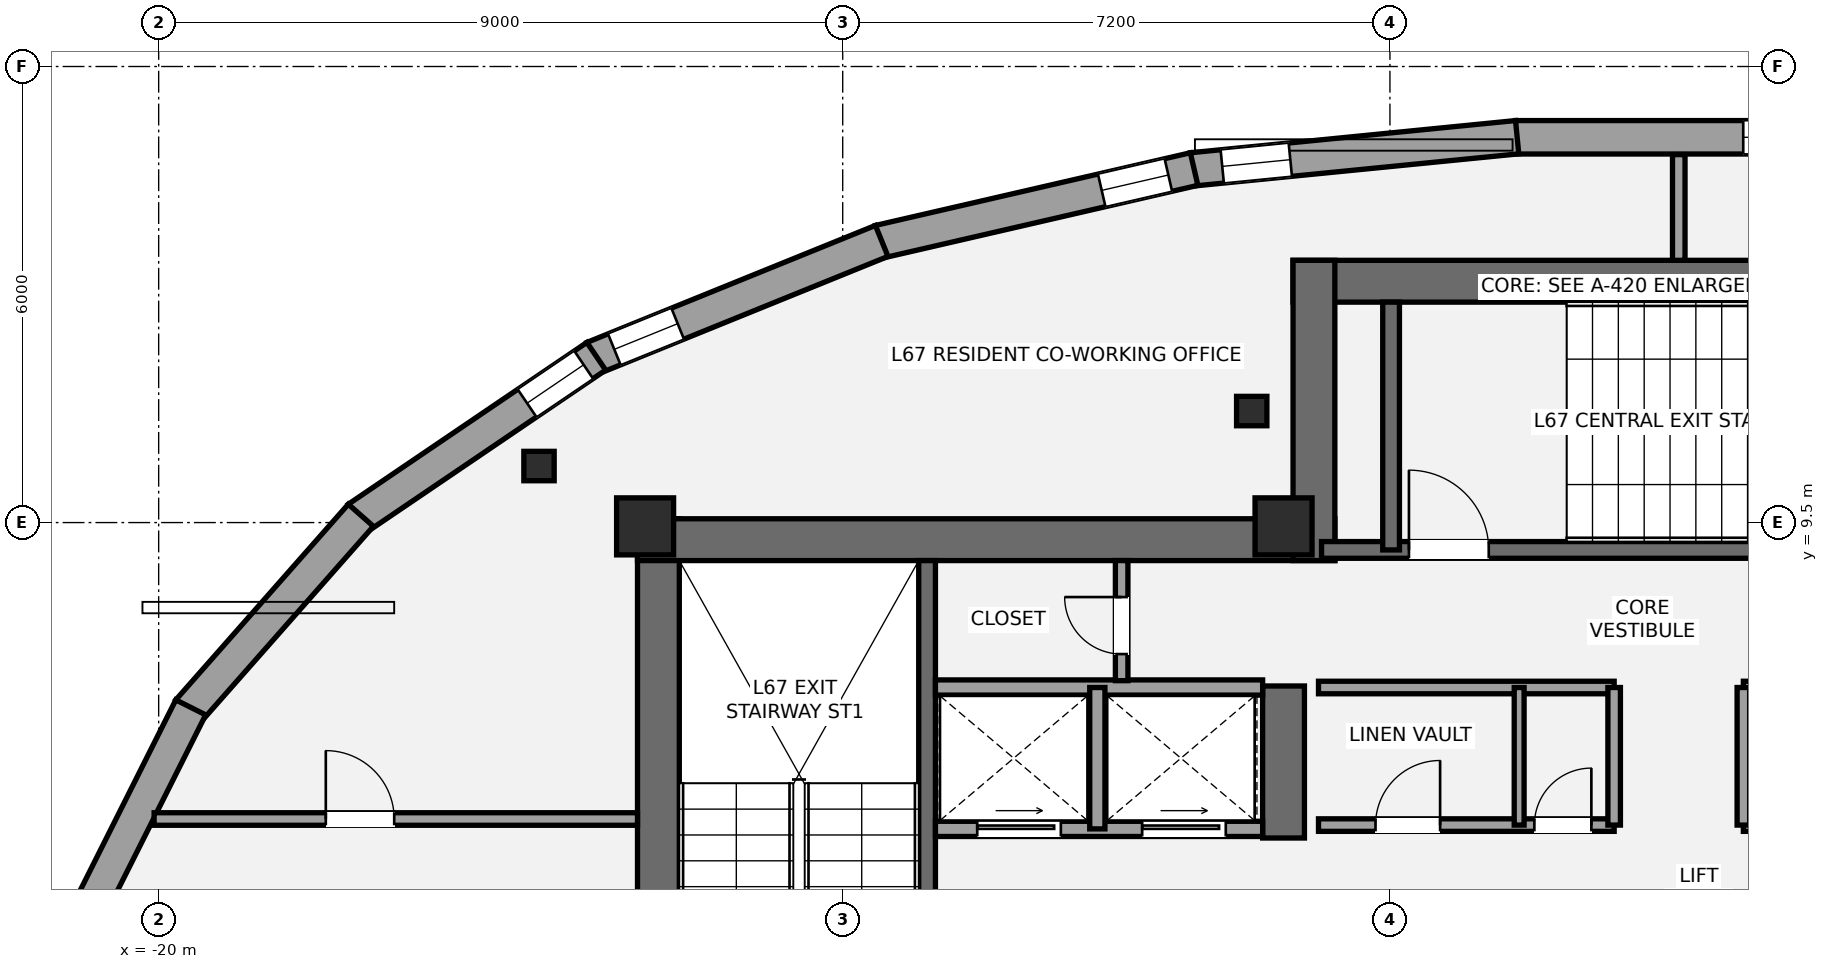
"""IFC4 building model, lengths in metres.
Left out: names, types, materials, properties, quantities, classifications, styles, units other than length and angle.
Written with IfcOpenShell. Run it as: python <this file> out.ifc"""

import sys

from ifc_helpers import new_model, si_unit, direction, frame, frame_2d, origin, origin_2d, place, context, subcontext, project, spatial, rectangle, i_section, extrude, element, fill, save


model = new_model("IFC4")
c1 = context("Model", 3, precision=1e-05, world=origin(), true_north=direction((0.0, 1.0)))
c2 = subcontext(c1, "Body", "Model", "MODEL_VIEW")
j1 = project(units=[si_unit("LENGTHUNIT", "METRE"), si_unit("PLANEANGLEUNIT", "RADIAN")], contexts=[c1])
p1 = place(None, origin())
s1 = spatial("IfcSite", under=j1, at=p1, CompositionType="ELEMENT")
p2 = place(p1, origin())
s2 = spatial("IfcBuilding", under=s1, at=p2, CompositionType="ELEMENT")
p3 = place(p2, frame((0.0, 0.0, 238.35)))
s3 = spatial("IfcBuildingStorey", under=s2, at=p3, CompositionType="ELEMENT", Elevation=238.35)
p4 = place(p3, frame((-13.425, 1.3, 0.0), z_axis=(0.0, 0.0, 1.0), x_axis=(0.0, 1.0, 0.0)))
e1 = element("IfcWall", 1, at=p4, inside=s3, PredefinedType="SHEAR", context=c2, shape_type="SweptSolid", body=[
    extrude(rectangle(XDim=8.25, YDim=0.55, at=frame_2d((4.125, 0.0))), origin(), (0.0, 0.0, 1.0), 3.15),
])
p5 = place(p3, frame((-13.7, 9.275, 0.0), z_axis=(0.0, 0.0, 1.0), x_axis=(1.0, 0.0, 0.0)))
e2 = element("IfcWall", 2, at=p5, inside=s3, PredefinedType="SHEAR", context=c2, shape_type="SweptSolid", body=[
    extrude(rectangle(XDim=9.175, YDim=0.55, at=frame_2d((4.587, 0.0))), origin(), (0.0, 0.0, 1.0), 3.15),
])
p6 = place(p3, frame((-5.2, 5.35, 0.0), z_axis=(0.0, 0.0, 1.0), x_axis=(0.0, 1.0, 0.0)))
e3 = element("IfcWall", 3, at=p6, inside=s3, PredefinedType="SHEAR", context=c2, shape_type="SweptSolid", body=[
    extrude(rectangle(XDim=2.0, YDim=0.55, at=frame_2d((1.0, 0.0))), origin(), (0.0, 0.0, 1.0), 3.15),
])
p7 = place(p3, frame((-9.89, 1.85, 0.0), z_axis=(0.0, 0.0, 1.0), x_axis=(0.0, 1.0, 0.0)))
e4 = element("IfcWall", 4, at=p7, inside=s3, PredefinedType="SHEAR", context=c2, shape_type="SweptSolid", body=[
    extrude(rectangle(XDim=7.15, YDim=0.22, at=frame_2d((3.575, 0.0))), origin(), (0.0, 0.0, 1.0), 3.15),
])
p8 = place(p3, frame((-5.075, 12.675, 0.0), z_axis=(0.0, 0.0, 1.0), x_axis=(1.0, 0.0, 0.0)))
e5 = element("IfcWall", 5, at=p8, inside=s3, PredefinedType="SHEAR", context=c2, shape_type="SweptSolid", body=[
    extrude(rectangle(XDim=10.15, YDim=0.55, at=frame_2d((5.075, 0.0))), origin(), (0.0, 0.0, 1.0), 3.15),
])
p9 = place(p3, frame((-4.8, 9.0, 0.0), z_axis=(0.0, 0.0, 1.0), x_axis=(0.0, 1.0, 0.0)))
e6 = element("IfcWall", 6, at=p9, inside=s3, PredefinedType="SHEAR", context=c2, shape_type="SweptSolid", body=[
    extrude(rectangle(XDim=3.95, YDim=0.55, at=frame_2d((1.975, 0.0))), origin(), (0.0, 0.0, 1.0), 3.15),
])
p10 = place(p3, frame((-4.7, 9.14, 0.0), z_axis=(0.0, 0.0, 1.0), x_axis=(1.0, 0.0, 0.0)))
e7 = element("IfcWall", 7, at=p10, inside=s3, PredefinedType="SHEAR", context=c2, shape_type="SweptSolid", body=[
    extrude(rectangle(XDim=9.3, YDim=0.22, at=frame_2d((4.65, 0.0))), origin(), (0.0, 0.0, 1.0), 3.15),
])
p11 = place(p10, frame((1.15, 0.0, 0.0)))
e8 = element("IfcOpeningElement", 8, at=p11, cuts=e7, PredefinedType="OPENING", context=c2, shape_type="SweptSolid", body=[
    extrude(rectangle(XDim=1.05, YDim=2.15, at=frame_2d((0.525, 1.075))), frame((0.0, 0.12, 0.0), z_axis=(0.0, -1.0, 0.0), x_axis=(1.0, 0.0, 0.0)), (0.0, 0.0, 1.0), 0.24),
])
p12 = place(p3, frame((-3.785, 9.14, 0.0), z_axis=(0.0, 0.0, 1.0), x_axis=(0.0, 1.0, 0.0)))
e9 = element("IfcWall", 9, at=p12, inside=s3, PredefinedType="SHEAR", context=c2, shape_type="SweptSolid", body=[
    extrude(rectangle(XDim=3.26, YDim=0.22, at=frame_2d((1.63, 0.0))), origin(), (0.0, 0.0, 1.0), 3.15),
])
for number, where, z_axis, x_axis in (
    (10, (-13.6, 9.45, 0.0), (0.0, 0.0, 1.0), (1.0, 0.0, 0.0)),
    (11, (-5.2, 9.45, 0.0), (0.0, 0.0, 1.0), (1.0, 0.0, 0.0)),
):
    element("IfcColumn", number, at=place(p3, frame(where, z_axis=z_axis, x_axis=x_axis)), inside=s3, PredefinedType="PILASTER", context=c2, shape_type="SweptSolid", body=[
        extrude(rectangle(XDim=0.75, YDim=0.75, at=origin_2d()), origin(), (0.0, 0.0, 1.0), 3.15),
    ])
for number, where, z_axis, x_axis in (
    (12, (-5.619, 10.967, 0.0), (0.0, 0.0, 1.0), (1.0, 0.0, 0.0)),
    (13, (-14.996, 10.244, 0.0), (0.0, 0.0, 1.0), (1.0, 0.0, 0.0)),
):
    element("IfcColumn", number, at=place(p3, frame(where, z_axis=z_axis, x_axis=x_axis)), inside=s3, PredefinedType="COLUMN", context=c2, shape_type="SweptSolid", body=[
        extrude(i_section(OverallWidth=0.399, OverallDepth=0.387, WebThickness=0.021, FlangeThickness=0.033, at=origin_2d()), origin(), (0.0, 0.0, 1.0), 3.15),
    ])
p13 = place(p3, frame((-2.148, 14.569, 0.0), z_axis=(0.0, 0.0, 1.0), x_axis=(1.0, 0.0, 0.0)))
e14 = element("IfcWall", 14, at=p13, inside=s3, PredefinedType="STANDARD", context=c2, shape_type="SweptSolid", body=[
    extrude(rectangle(XDim=4.296, YDim=0.44, at=frame_2d((2.148, 0.0))), origin(), (0.0, 0.0, 1.0), 2.336),
])
p14 = place(p13, frame((2.996, 0.0, 0.58)))
e15 = element("IfcOpeningElement", 15, at=p14, cuts=e14, PredefinedType="OPENING", context=c2, shape_type="SweptSolid", body=[
    extrude(rectangle(XDim=0.9, YDim=1.35, at=frame_2d((0.45, 0.675))), frame((0.0, 0.23, 0.0), z_axis=(0.0, -1.0, 0.0), x_axis=(1.0, 0.0, 0.0)), (0.0, 0.0, 1.0), 0.46),
])
p15 = place(p3, frame((-6.405, 14.146, 0.0), z_axis=(0.0, 0.0, 1.0), x_axis=(0.995134540264, 0.098525361068, 0.0)))
e16 = element("IfcWall", 16, at=p15, inside=s3, PredefinedType="STANDARD", context=c2, shape_type="SweptSolid", body=[
    extrude(rectangle(XDim=4.299, YDim=0.44, at=frame_2d((2.15, 0.0))), origin(), (0.0, 0.0, 1.0), 2.336),
])
p16 = place(p15, frame((0.4, 0.0, 0.58)))
e17 = element("IfcOpeningElement", 17, at=p16, cuts=e16, PredefinedType="OPENING", context=c2, shape_type="SweptSolid", body=[
    extrude(rectangle(XDim=0.9, YDim=1.35, at=frame_2d((0.45, 0.675))), frame((0.0, 0.23, 0.0), z_axis=(0.0, -1.0, 0.0), x_axis=(1.0, 0.0, 0.0)), (0.0, 0.0, 1.0), 0.46),
])
p17 = place(p3, frame((-10.52, 13.195, 0.0), z_axis=(0.0, 0.0, 1.0), x_axis=(0.974398936081, 0.224825962391, 0.0)))
e18 = element("IfcWall", 18, at=p17, inside=s3, PredefinedType="STANDARD", context=c2, shape_type="SweptSolid", body=[
    extrude(rectangle(XDim=4.252, YDim=0.44, at=frame_2d((2.126, 0.0))), origin(), (0.0, 0.0, 1.0), 2.336),
])
p18 = place(p17, frame((3.005, 0.0, 0.58)))
e19 = element("IfcOpeningElement", 19, at=p18, cuts=e18, PredefinedType="OPENING", context=c2, shape_type="SweptSolid", body=[
    extrude(rectangle(XDim=0.9, YDim=1.35, at=frame_2d((0.45, 0.675))), frame((0.0, 0.23, 0.0), z_axis=(0.0, -1.0, 0.0), x_axis=(1.0, 0.0, 0.0)), (0.0, 0.0, 1.0), 0.46),
])
p19 = place(p3, frame((-14.283, 11.666, 0.0), z_axis=(0.0, 0.0, 1.0), x_axis=(0.926731976866, 0.375723093586, 0.0)))
e20 = element("IfcWall", 20, at=p19, inside=s3, PredefinedType="STANDARD", context=c2, shape_type="SweptSolid", body=[
    extrude(rectangle(XDim=4.096, YDim=0.44, at=frame_2d((2.048, 0.0))), origin(), (0.0, 0.0, 1.0), 2.336),
])
p20 = place(p19, frame((0.3, 0.0, 0.58)))
e21 = element("IfcOpeningElement", 21, at=p20, cuts=e20, PredefinedType="OPENING", context=c2, shape_type="SweptSolid", body=[
    extrude(rectangle(XDim=0.9, YDim=1.35, at=frame_2d((0.45, 0.675))), frame((0.0, 0.23, 0.0), z_axis=(0.0, -1.0, 0.0), x_axis=(1.0, 0.0, 0.0)), (0.0, 0.0, 1.0), 0.46),
])
p21 = place(p3, frame((-17.381, 9.559, 0.0), z_axis=(0.0, 0.0, 1.0), x_axis=(0.827637036896, 0.561263694851, 0.0)))
e22 = element("IfcWall", 22, at=p21, inside=s3, PredefinedType="STANDARD", context=c2, shape_type="SweptSolid", body=[
    extrude(rectangle(XDim=3.793, YDim=0.44, at=frame_2d((1.896, 0.0))), origin(), (0.0, 0.0, 1.0), 2.336),
])
p22 = place(p21, frame((2.693, 0.0, 0.58)))
e23 = element("IfcOpeningElement", 23, at=p22, cuts=e22, PredefinedType="OPENING", context=c2, shape_type="SweptSolid", body=[
    extrude(rectangle(XDim=0.9, YDim=1.35, at=frame_2d((0.45, 0.675))), frame((0.0, 0.23, 0.0), z_axis=(0.0, -1.0, 0.0), x_axis=(1.0, 0.0, 0.0)), (0.0, 0.0, 1.0), 0.46),
])
p23 = place(p3, frame((-19.61, 7.022, 0.0), z_axis=(0.0, 0.0, 1.0), x_axis=(0.66136043846, 0.750068243855, 0.0)))
e24 = element("IfcWall", 24, at=p23, inside=s3, PredefinedType="STANDARD", context=c2, shape_type="SweptSolid", body=[
    extrude(rectangle(XDim=3.432, YDim=0.44, at=frame_2d((1.716, 0.0))), origin(), (0.0, 0.0, 1.0), 2.336),
])
p24 = place(p3, frame((-20.988, 4.259, 0.0), z_axis=(0.0, 0.0, 1.0), x_axis=(0.448424724145, 0.893820601002, 0.0)))
e25 = element("IfcWall", 25, at=p24, inside=s3, PredefinedType="STANDARD", context=c2, shape_type="SweptSolid", body=[
    extrude(rectangle(XDim=3.144, YDim=0.44, at=frame_2d((1.572, 0.0))), origin(), (0.0, 0.0, 1.0), 2.336),
])
p25 = place(p3, frame((-9.78, 5.47, 0.0), z_axis=(0.0, 0.0, 1.0), x_axis=(1.0, 0.0, 0.0)))
e26 = element("IfcWall", 26, at=p25, inside=s3, PredefinedType="SOLIDWALL", context=c2, shape_type="SweptSolid", body=[
    extrude(rectangle(XDim=4.305, YDim=0.2, at=frame_2d((2.152, 0.0))), origin(), (0.0, 0.0, 1.0), 2.97),
])
p26 = place(p25, frame((0.55, 0.0, 0.0)))
e27 = element("IfcOpeningElement", 27, at=p26, cuts=e26, PredefinedType="OPENING", context=c2, shape_type="SweptSolid", body=[
    extrude(rectangle(XDim=1.1, YDim=2.2, at=frame_2d((0.55, 1.1))), frame((0.0, 0.11, 0.0), z_axis=(0.0, -1.0, 0.0), x_axis=(1.0, 0.0, 0.0)), (0.0, 0.0, 1.0), 0.22),
])
p27 = place(p25, frame((2.72, 0.0, 0.0)))
e28 = element("IfcOpeningElement", 28, at=p27, cuts=e26, PredefinedType="OPENING", context=c2, shape_type="SweptSolid", body=[
    extrude(rectangle(XDim=1.1, YDim=2.2, at=frame_2d((0.55, 1.1))), frame((0.0, 0.11, 0.0), z_axis=(0.0, -1.0, 0.0), x_axis=(1.0, 0.0, 0.0)), (0.0, 0.0, 1.0), 0.22),
])
p28 = place(p3, frame((-9.78, 7.33, 0.0), z_axis=(0.0, 0.0, 1.0), x_axis=(1.0, 0.0, 0.0)))
e29 = element("IfcWall", 29, at=p28, inside=s3, PredefinedType="SOLIDWALL", context=c2, shape_type="SweptSolid", body=[
    extrude(rectangle(XDim=4.305, YDim=0.2, at=frame_2d((2.152, 0.0))), origin(), (0.0, 0.0, 1.0), 2.97),
])
p29 = place(p3, frame((-7.65, 5.47, 0.0), z_axis=(0.0, 0.0, 1.0), x_axis=(0.0, 1.0, 0.0)))
e30 = element("IfcWall", 30, at=p29, inside=s3, PredefinedType="SOLIDWALL", context=c2, shape_type="SweptSolid", body=[
    extrude(rectangle(XDim=1.86, YDim=0.2, at=frame_2d((0.93, 0.0))), origin(), (0.0, 0.0, 1.0), 2.97),
])
p30 = place(p3, frame((-4.74, 5.52, 0.0), z_axis=(0.0, 0.0, 1.0), x_axis=(1.0, 0.0, 0.0)))
e31 = element("IfcWall", 31, at=p30, inside=s3, PredefinedType="PARTITIONING", context=c2, shape_type="SweptSolid", body=[
    extrude(rectangle(XDim=3.89, YDim=0.165, at=frame_2d((1.945, 0.0))), origin(), (0.0, 0.0, 1.0), 2.97),
])
p31 = place(p30, frame((0.75, 0.0, 0.0)))
e32 = element("IfcOpeningElement", 32, at=p31, cuts=e31, PredefinedType="OPENING", context=c2, shape_type="SweptSolid", body=[
    extrude(rectangle(XDim=0.85, YDim=2.1, at=frame_2d((0.425, 1.05))), frame((0.0, 0.093, 0.0), z_axis=(0.0, -1.0, 0.0), x_axis=(1.0, 0.0, 0.0)), (0.0, 0.0, 1.0), 0.185),
])
p32 = place(p30, frame((2.84, 0.0, 0.0)))
e33 = element("IfcOpeningElement", 33, at=p32, cuts=e31, PredefinedType="OPENING", context=c2, shape_type="SweptSolid", body=[
    extrude(rectangle(XDim=0.75, YDim=2.1, at=frame_2d((0.375, 1.05))), frame((0.0, 0.093, 0.0), z_axis=(0.0, -1.0, 0.0), x_axis=(1.0, 0.0, 0.0)), (0.0, 0.0, 1.0), 0.185),
])
p33 = place(p3, frame((-4.74, 7.33, 0.0), z_axis=(0.0, 0.0, 1.0), x_axis=(1.0, 0.0, 0.0)))
e34 = element("IfcWall", 34, at=p33, inside=s3, PredefinedType="PARTITIONING", context=c2, shape_type="SweptSolid", body=[
    extrude(rectangle(XDim=3.89, YDim=0.165, at=frame_2d((1.945, 0.0))), origin(), (0.0, 0.0, 1.0), 2.97),
])
p34 = place(p3, frame((-0.85, 5.52, 0.0), z_axis=(0.0, 0.0, 1.0), x_axis=(0.0, 1.0, 0.0)))
e35 = element("IfcWall", 35, at=p34, inside=s3, PredefinedType="PARTITIONING", context=c2, shape_type="SweptSolid", body=[
    extrude(rectangle(XDim=1.81, YDim=0.165, at=frame_2d((0.905, 0.0))), origin(), (0.0, 0.0, 1.0), 2.97),
])
p35 = place(p3, frame((0.85, 5.52, 0.0), z_axis=(0.0, 0.0, 1.0), x_axis=(1.0, 0.0, 0.0)))
e36 = element("IfcWall", 36, at=p35, inside=s3, PredefinedType="PARTITIONING", context=c2, shape_type="SweptSolid", body=[
    extrude(rectangle(XDim=3.89, YDim=0.165, at=frame_2d((1.945, 0.0))), origin(), (0.0, 0.0, 1.0), 2.97),
])
p36 = place(p35, frame((1.6, 0.0, 0.0)))
e37 = element("IfcOpeningElement", 37, at=p36, cuts=e36, PredefinedType="OPENING", context=c2, shape_type="SweptSolid", body=[
    extrude(rectangle(XDim=0.85, YDim=2.1, at=frame_2d((0.425, 1.05))), frame((0.0, 0.093, 0.0), z_axis=(0.0, -1.0, 0.0), x_axis=(1.0, 0.0, 0.0)), (0.0, 0.0, 1.0), 0.185),
])
p37 = place(p3, frame((0.85, 7.33, 0.0), z_axis=(0.0, 0.0, 1.0), x_axis=(1.0, 0.0, 0.0)))
e38 = element("IfcWall", 38, at=p37, inside=s3, PredefinedType="PARTITIONING", context=c2, shape_type="SweptSolid", body=[
    extrude(rectangle(XDim=3.89, YDim=0.165, at=frame_2d((1.945, 0.0))), origin(), (0.0, 0.0, 1.0), 2.97),
])
p38 = place(p3, frame((0.85, 5.52, 0.0), z_axis=(0.0, 0.0, 1.0), x_axis=(0.0, 1.0, 0.0)))
e39 = element("IfcWall", 39, at=p38, inside=s3, PredefinedType="PARTITIONING", context=c2, shape_type="SweptSolid", body=[
    extrude(rectangle(XDim=1.81, YDim=0.165, at=frame_2d((0.905, 0.0))), origin(), (0.0, 0.0, 1.0), 2.97),
])
p39 = place(p3, frame((-2.1, 5.52, 0.0), z_axis=(0.0, 0.0, 1.0), x_axis=(0.0, 1.0, 0.0)))
e40 = element("IfcWall", 40, at=p39, inside=s3, PredefinedType="PARTITIONING", context=c2, shape_type="SweptSolid", body=[
    extrude(rectangle(XDim=1.81, YDim=0.13, at=frame_2d((0.905, 0.0))), origin(), (0.0, 0.0, 1.0), 2.97),
])
p40 = place(p3, frame((-7.33, 7.42, 0.0), z_axis=(0.0, 0.0, 1.0), x_axis=(0.0, 1.0, 0.0)))
e41 = element("IfcWall", 41, at=p40, inside=s3, PredefinedType="PARTITIONING", context=c2, shape_type="SweptSolid", body=[
    extrude(rectangle(XDim=1.58, YDim=0.165, at=frame_2d((0.79, 0.0))), origin(), (0.0, 0.0, 1.0), 2.97),
])
p41 = place(p40, frame((0.35, 0.0, 0.0)))
e42 = element("IfcOpeningElement", 42, at=p41, cuts=e41, PredefinedType="OPENING", context=c2, shape_type="SweptSolid", body=[
    extrude(rectangle(XDim=0.75, YDim=2.1, at=frame_2d((0.375, 1.05))), frame((0.0, 0.093, 0.0), z_axis=(0.0, -1.0, 0.0), x_axis=(1.0, 0.0, 0.0)), (0.0, 0.0, 1.0), 0.185),
])
p42 = place(p3, frame((0.0, 12.95, 0.0), z_axis=(0.0, 0.0, 1.0), x_axis=(0.0, 1.0, 0.0)))
e43 = element("IfcWall", 43, at=p42, inside=s3, PredefinedType="PARTITIONING", context=c2, shape_type="SweptSolid", body=[
    extrude(rectangle(XDim=1.391, YDim=0.165, at=frame_2d((0.695, 0.0))), origin(), (0.0, 0.0, 1.0), 2.97),
])
p43 = place(p3, frame((-20.06, 5.6, 0.0), z_axis=(0.0, 0.0, 1.0), x_axis=(1.0, 0.0, 0.0)))
e44 = element("IfcWall", 44, at=p43, inside=s3, PredefinedType="PARTITIONING", context=c2, shape_type="SweptSolid", body=[
    extrude(rectangle(XDim=6.36, YDim=0.165, at=frame_2d((3.18, 0.0))), origin(), (0.0, 0.0, 1.0), 2.423),
])
p44 = place(p43, frame((2.259, 0.0, 0.0)))
e45 = element("IfcOpeningElement", 45, at=p44, cuts=e44, PredefinedType="OPENING", context=c2, shape_type="SweptSolid", body=[
    extrude(rectangle(XDim=0.9, YDim=2.1, at=frame_2d((0.45, 1.05))), frame((0.0, 0.093, 0.0), z_axis=(0.0, -1.0, 0.0), x_axis=(1.0, 0.0, 0.0)), (0.0, 0.0, 1.0), 0.185),
])
p45 = place(p14, origin())
e46 = element("IfcWindow", 46, at=p45, inside=s3, PartitioningType="SINGLE_PANEL", PredefinedType="WINDOW", context=c2, shape_type="SweptSolid", body=[
    extrude(rectangle(XDim=0.9, YDim=1.35, at=frame_2d((0.45, 0.675))), frame((0.0, -0.01, 0.0), z_axis=(0.0, -1.0, 0.0), x_axis=(1.0, 0.0, 0.0)), (0.0, 0.0, 1.0), 0.06),
])
fill(e15, e46)
p46 = place(p16, origin())
e47 = element("IfcWindow", 47, at=p46, inside=s3, PartitioningType="SINGLE_PANEL", PredefinedType="WINDOW", context=c2, shape_type="SweptSolid", body=[
    extrude(rectangle(XDim=0.9, YDim=1.35, at=frame_2d((0.45, 0.675))), frame((0.0, -0.01, 0.0), z_axis=(0.0, -1.0, 0.0), x_axis=(1.0, 0.0, 0.0)), (0.0, 0.0, 1.0), 0.06),
])
fill(e17, e47)
p47 = place(p18, origin())
e48 = element("IfcWindow", 48, at=p47, inside=s3, PartitioningType="SINGLE_PANEL", PredefinedType="WINDOW", context=c2, shape_type="SweptSolid", body=[
    extrude(rectangle(XDim=0.9, YDim=1.35, at=frame_2d((0.45, 0.675))), frame((0.0, -0.01, 0.0), z_axis=(0.0, -1.0, 0.0), x_axis=(1.0, 0.0, 0.0)), (0.0, 0.0, 1.0), 0.06),
])
fill(e19, e48)
p48 = place(p20, origin())
e49 = element("IfcWindow", 49, at=p48, inside=s3, PartitioningType="SINGLE_PANEL", PredefinedType="WINDOW", context=c2, shape_type="SweptSolid", body=[
    extrude(rectangle(XDim=0.9, YDim=1.35, at=frame_2d((0.45, 0.675))), frame((0.0, -0.01, 0.0), z_axis=(0.0, -1.0, 0.0), x_axis=(1.0, 0.0, 0.0)), (0.0, 0.0, 1.0), 0.06),
])
fill(e21, e49)
p49 = place(p22, origin())
e50 = element("IfcWindow", 50, at=p49, inside=s3, PartitioningType="SINGLE_PANEL", PredefinedType="WINDOW", context=c2, shape_type="SweptSolid", body=[
    extrude(rectangle(XDim=0.9, YDim=1.35, at=frame_2d((0.45, 0.675))), frame((0.0, -0.01, 0.0), z_axis=(0.0, -1.0, 0.0), x_axis=(1.0, 0.0, 0.0)), (0.0, 0.0, 1.0), 0.06),
])
fill(e23, e50)
p50 = place(p11, origin())
e51 = element("IfcDoor", 51, at=p50, inside=s3, OperationType="SINGLE_SWING_LEFT", PredefinedType="DOOR", context=c2, shape_type="SweptSolid", body=[
    extrude(rectangle(XDim=1.05, YDim=2.15, at=frame_2d((0.525, 1.075))), frame((0.0, 0.025, 0.0), z_axis=(0.0, -1.0, 0.0), x_axis=(1.0, 0.0, 0.0)), (0.0, 0.0, 1.0), 0.05),
])
fill(e8, e51)
p51 = place(p26, origin())
e52 = element("IfcDoor", 52, at=p51, inside=s3, OperationType="SLIDING_TO_LEFT", PredefinedType="DOOR", context=c2, shape_type="SweptSolid", body=[
    extrude(rectangle(XDim=1.1, YDim=2.2, at=frame_2d((0.55, 1.1))), frame((0.0, 0.025, 0.0), z_axis=(0.0, -1.0, 0.0), x_axis=(1.0, 0.0, 0.0)), (0.0, 0.0, 1.0), 0.05),
])
fill(e27, e52)
p52 = place(p27, origin())
e53 = element("IfcDoor", 53, at=p52, inside=s3, OperationType="SLIDING_TO_LEFT", PredefinedType="DOOR", context=c2, shape_type="SweptSolid", body=[
    extrude(rectangle(XDim=1.1, YDim=2.2, at=frame_2d((0.55, 1.1))), frame((0.0, 0.025, 0.0), z_axis=(0.0, -1.0, 0.0), x_axis=(1.0, 0.0, 0.0)), (0.0, 0.0, 1.0), 0.05),
])
fill(e28, e53)
p53 = place(p31, origin())
e54 = element("IfcDoor", 54, at=p53, inside=s3, OperationType="SINGLE_SWING_RIGHT", PredefinedType="DOOR", context=c2, shape_type="SweptSolid", body=[
    extrude(rectangle(XDim=0.85, YDim=2.1, at=frame_2d((0.425, 1.05))), frame((0.0, 0.025, 0.0), z_axis=(0.0, -1.0, 0.0), x_axis=(1.0, 0.0, 0.0)), (0.0, 0.0, 1.0), 0.05),
])
fill(e32, e54)
p54 = place(p32, origin())
e55 = element("IfcDoor", 55, at=p54, inside=s3, OperationType="SINGLE_SWING_RIGHT", PredefinedType="DOOR", context=c2, shape_type="SweptSolid", body=[
    extrude(rectangle(XDim=0.75, YDim=2.1, at=frame_2d((0.375, 1.05))), frame((0.0, 0.025, 0.0), z_axis=(0.0, -1.0, 0.0), x_axis=(1.0, 0.0, 0.0)), (0.0, 0.0, 1.0), 0.05),
])
fill(e33, e55)
p55 = place(p41, origin())
e56 = element("IfcDoor", 56, at=p55, inside=s3, OperationType="SINGLE_SWING_RIGHT", PredefinedType="DOOR", context=c2, shape_type="SweptSolid", body=[
    extrude(rectangle(XDim=0.75, YDim=2.1, at=frame_2d((0.375, 1.05))), frame((0.0, 0.025, 0.0), z_axis=(0.0, -1.0, 0.0), x_axis=(1.0, 0.0, 0.0)), (0.0, 0.0, 1.0), 0.05),
])
fill(e42, e56)
p56 = place(p44, origin())
e57 = element("IfcDoor", 57, at=p56, inside=s3, OperationType="SINGLE_SWING_LEFT", PredefinedType="DOOR", context=c2, shape_type="SweptSolid", body=[
    extrude(rectangle(XDim=0.9, YDim=2.1, at=frame_2d((0.45, 1.05))), frame((0.0, 0.025, 0.0), z_axis=(0.0, -1.0, 0.0), x_axis=(1.0, 0.0, 0.0)), (0.0, 0.0, 1.0), 0.05),
])
fill(e45, e57)
save(model, sys.argv[1])
